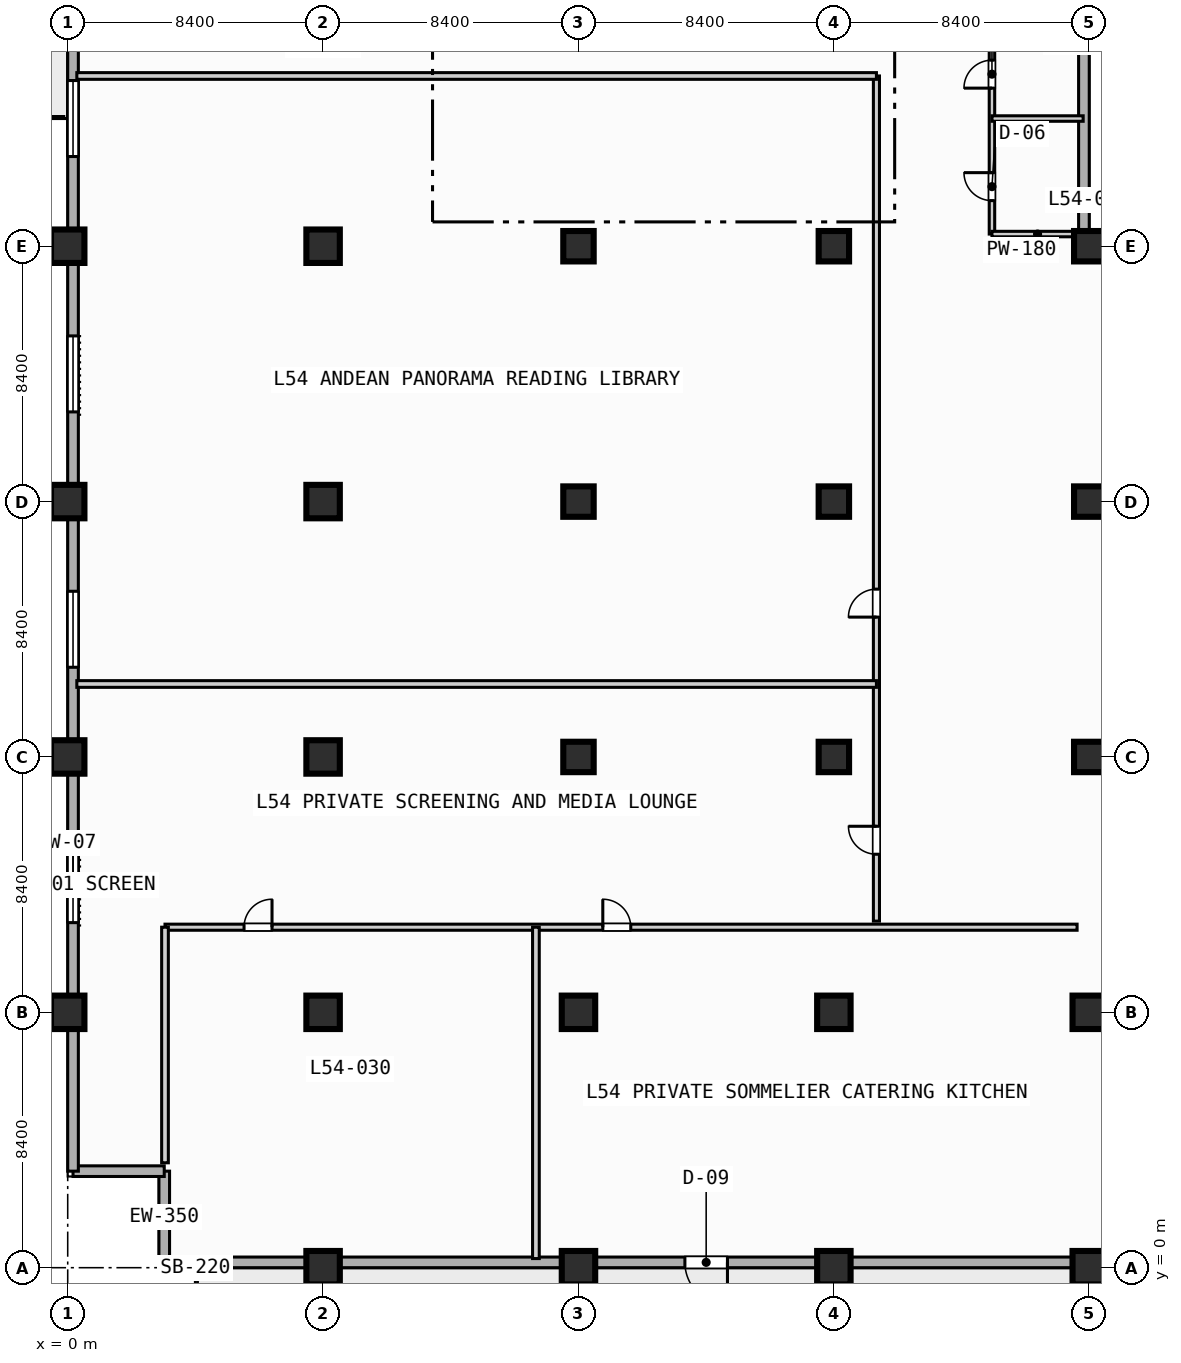
"""IFC4 building model, lengths in metres.
Left out: names, types, materials, properties, quantities, classifications, styles, units other than length and angle.
Written with IfcOpenShell. Run it as: python <this file> out.ifc"""

import sys

from ifc_helpers import new_model, si_unit, direction, frame, frame_2d, origin, origin_2d, place, context, subcontext, project, spatial, rectangle, extrude, element, fill, save


model = new_model("IFC4")
c1 = context("Model", 3, precision=1e-05, world=origin(), true_north=direction((0.0, 1.0)))
c2 = subcontext(c1, "Body", "Model", "MODEL_VIEW")
j1 = project(units=[si_unit("LENGTHUNIT", "METRE"), si_unit("PLANEANGLEUNIT", "RADIAN")], contexts=[c1])
p1 = place(None, origin())
s1 = spatial("IfcSite", under=j1, at=p1, CompositionType="ELEMENT")
p2 = place(p1, origin())
s2 = spatial("IfcBuilding", under=s1, at=p2, CompositionType="ELEMENT")
p3 = place(p2, frame((0.0, 0.0, 219.8)))
s3 = spatial("IfcBuildingStorey", under=s2, at=p3, CompositionType="ELEMENT", Elevation=219.8)
for number, where, z_axis, x_axis in (
    (1, (0.0, 8.4, 0.0), (0.0, 0.0, 1.0), (1.0, 0.0, 0.0)),
    (2, (0.0, 16.8, 0.0), (0.0, 0.0, 1.0), (1.0, 0.0, 0.0)),
    (3, (0.0, 25.2, 0.0), (0.0, 0.0, 1.0), (1.0, 0.0, 0.0)),
    (4, (0.0, 33.6, 0.0), (0.0, 0.0, 1.0), (1.0, 0.0, 0.0)),
    (5, (8.4, 0.0, 0.0), (0.0, 0.0, 1.0), (1.0, 0.0, 0.0)),
    (6, (8.4, 8.4, 0.0), (0.0, 0.0, 1.0), (1.0, 0.0, 0.0)),
    (7, (8.4, 16.8, 0.0), (0.0, 0.0, 1.0), (1.0, 0.0, 0.0)),
    (8, (8.4, 25.2, 0.0), (0.0, 0.0, 1.0), (1.0, 0.0, 0.0)),
    (9, (8.4, 33.6, 0.0), (0.0, 0.0, 1.0), (1.0, 0.0, 0.0)),
    (10, (16.8, 0.0, 0.0), (0.0, 0.0, 1.0), (1.0, 0.0, 0.0)),
    (11, (16.8, 8.4, 0.0), (0.0, 0.0, 1.0), (1.0, 0.0, 0.0)),
):
    element("IfcColumn", number, at=place(p3, frame(where, z_axis=z_axis, x_axis=x_axis)), inside=s3, PredefinedType="COLUMN", context=c2, shape_type="SweptSolid", body=[
        extrude(rectangle(XDim=1.1, YDim=1.1, at=origin_2d()), origin(), (0.0, 0.0, 1.0), 4.2),
    ])
for number, where, z_axis, x_axis in (
    (12, (16.8, 16.8, 0.0), (0.0, 0.0, 1.0), (1.0, 0.0, 0.0)),
    (13, (16.8, 25.2, 0.0), (0.0, 0.0, 1.0), (1.0, 0.0, 0.0)),
    (14, (16.8, 33.6, 0.0), (0.0, 0.0, 1.0), (1.0, 0.0, 0.0)),
):
    element("IfcColumn", number, at=place(p3, frame(where, z_axis=z_axis, x_axis=x_axis)), inside=s3, PredefinedType="COLUMN", context=c2, shape_type="SweptSolid", body=[
        extrude(rectangle(XDim=1.0, YDim=1.0, at=origin_2d()), origin(), (0.0, 0.0, 1.0), 4.2),
    ])
for number, where, z_axis, x_axis in (
    (15, (25.2, 0.0, 0.0), (0.0, 0.0, 1.0), (1.0, 0.0, 0.0)),
    (16, (25.2, 8.4, 0.0), (0.0, 0.0, 1.0), (1.0, 0.0, 0.0)),
):
    element("IfcColumn", number, at=place(p3, frame(where, z_axis=z_axis, x_axis=x_axis)), inside=s3, PredefinedType="COLUMN", context=c2, shape_type="SweptSolid", body=[
        extrude(rectangle(XDim=1.1, YDim=1.1, at=origin_2d()), origin(), (0.0, 0.0, 1.0), 4.2),
    ])
for number, where, z_axis, x_axis in (
    (17, (25.2, 16.8, 0.0), (0.0, 0.0, 1.0), (1.0, 0.0, 0.0)),
    (18, (25.2, 25.2, 0.0), (0.0, 0.0, 1.0), (1.0, 0.0, 0.0)),
    (19, (25.2, 33.6, 0.0), (0.0, 0.0, 1.0), (1.0, 0.0, 0.0)),
):
    element("IfcColumn", number, at=place(p3, frame(where, z_axis=z_axis, x_axis=x_axis)), inside=s3, PredefinedType="COLUMN", context=c2, shape_type="SweptSolid", body=[
        extrude(rectangle(XDim=1.0, YDim=1.0, at=origin_2d()), origin(), (0.0, 0.0, 1.0), 4.2),
    ])
for number, where, z_axis, x_axis in (
    (20, (33.6, 0.0, 0.0), (0.0, 0.0, 1.0), (1.0, 0.0, 0.0)),
    (21, (33.6, 8.4, 0.0), (0.0, 0.0, 1.0), (1.0, 0.0, 0.0)),
):
    element("IfcColumn", number, at=place(p3, frame(where, z_axis=z_axis, x_axis=x_axis)), inside=s3, PredefinedType="COLUMN", context=c2, shape_type="SweptSolid", body=[
        extrude(rectangle(XDim=1.1, YDim=1.1, at=origin_2d()), origin(), (0.0, 0.0, 1.0), 4.2),
    ])
for number, where, z_axis, x_axis in (
    (22, (33.6, 16.8, 0.0), (0.0, 0.0, 1.0), (1.0, 0.0, 0.0)),
    (23, (33.6, 25.2, 0.0), (0.0, 0.0, 1.0), (1.0, 0.0, 0.0)),
    (24, (33.6, 33.6, 0.0), (0.0, 0.0, 1.0), (1.0, 0.0, 0.0)),
):
    element("IfcColumn", number, at=place(p3, frame(where, z_axis=z_axis, x_axis=x_axis)), inside=s3, PredefinedType="COLUMN", context=c2, shape_type="SweptSolid", body=[
        extrude(rectangle(XDim=1.0, YDim=1.0, at=origin_2d()), origin(), (0.0, 0.0, 1.0), 4.2),
    ])
for number, where, z_axis, x_axis in (
    (25, (3.175, 0.175, 0.0), (0.0, 0.0, 1.0), (0.0, 1.0, 0.0)),
    (26, (3.175, 3.175, 0.0), (0.0, 0.0, 1.0), (-1.0, 0.0, 0.0)),
):
    element("IfcWall", number, at=place(p3, frame(where, z_axis=z_axis, x_axis=x_axis)), inside=s3, PredefinedType="STANDARD", context=c2, shape_type="SweptSolid", body=[
        extrude(rectangle(XDim=3.0, YDim=0.35, at=frame_2d((1.5, 0.0))), origin(), (0.0, 0.0, 1.0), 3.97),
    ])
p4 = place(p3, frame((0.175, 3.175, 0.0), z_axis=(0.0, 0.0, 1.0), x_axis=(0.0, 1.0, 0.0)))
e27 = element("IfcWall", 27, at=p4, inside=s3, PredefinedType="STANDARD", context=c2, shape_type="SweptSolid", body=[
    extrude(rectangle(XDim=69.25, YDim=0.35, at=frame_2d((34.625, 0.0))), origin(), (0.0, 0.0, 1.0), 3.97),
])
p5 = place(p4, frame((42.325, 0.0, 0.0)))
e28 = element("IfcOpeningElement", 28, at=p5, cuts=e27, PredefinedType="OPENING", context=c2, shape_type="SweptSolid", body=[
    extrude(rectangle(XDim=1.4, YDim=2.2, at=frame_2d((0.7, 1.1))), frame((0.0, 0.185, 0.0), z_axis=(0.0, -1.0, 0.0), x_axis=(1.0, 0.0, 0.0)), (0.0, 0.0, 1.0), 0.37),
])
p6 = place(p4, frame((8.175, 0.0, 0.85)))
e29 = element("IfcOpeningElement", 29, at=p6, cuts=e27, PredefinedType="OPENING", context=c2, shape_type="SweptSolid", body=[
    extrude(rectangle(XDim=2.5, YDim=2.2, at=frame_2d((1.25, 1.1))), frame((0.0, 0.185, 0.0), z_axis=(0.0, -1.0, 0.0), x_axis=(1.0, 0.0, 0.0)), (0.0, 0.0, 1.0), 0.37),
])
p7 = place(p4, frame((16.575, 0.0, 0.85)))
e30 = element("IfcOpeningElement", 30, at=p7, cuts=e27, PredefinedType="OPENING", context=c2, shape_type="SweptSolid", body=[
    extrude(rectangle(XDim=2.5, YDim=2.2, at=frame_2d((1.25, 1.1))), frame((0.0, 0.185, 0.0), z_axis=(0.0, -1.0, 0.0), x_axis=(1.0, 0.0, 0.0)), (0.0, 0.0, 1.0), 0.37),
])
p8 = place(p4, frame((24.975, 0.0, 0.85)))
e31 = element("IfcOpeningElement", 31, at=p8, cuts=e27, PredefinedType="OPENING", context=c2, shape_type="SweptSolid", body=[
    extrude(rectangle(XDim=2.5, YDim=2.2, at=frame_2d((1.25, 1.1))), frame((0.0, 0.185, 0.0), z_axis=(0.0, -1.0, 0.0), x_axis=(1.0, 0.0, 0.0)), (0.0, 0.0, 1.0), 0.37),
])
p9 = place(p4, frame((33.375, 0.0, 0.85)))
e32 = element("IfcOpeningElement", 32, at=p9, cuts=e27, PredefinedType="OPENING", context=c2, shape_type="SweptSolid", body=[
    extrude(rectangle(XDim=2.5, YDim=2.2, at=frame_2d((1.25, 1.1))), frame((0.0, 0.185, 0.0), z_axis=(0.0, -1.0, 0.0), x_axis=(1.0, 0.0, 0.0)), (0.0, 0.0, 1.0), 0.37),
])
p10 = place(p3, frame((33.425, 72.425, 0.0), z_axis=(0.0, 0.0, 1.0), x_axis=(0.0, -1.0, 0.0)))
e33 = element("IfcWall", 33, at=p10, inside=s3, PredefinedType="STANDARD", context=c2, shape_type="SweptSolid", body=[
    extrude(rectangle(XDim=39.0, YDim=0.35, at=frame_2d((19.5, 0.0))), origin(), (0.0, 0.0, 1.0), 3.97),
])
p11 = place(p3, frame((33.425, 33.425, 0.0), z_axis=(0.0, 0.0, 1.0), x_axis=(1.0, 0.0, 0.0)))
e34 = element("IfcWall", 34, at=p11, inside=s3, PredefinedType="STANDARD", context=c2, shape_type="SweptSolid", body=[
    extrude(rectangle(XDim=39.0, YDim=0.35, at=frame_2d((19.5, 0.0))), origin(), (0.0, 0.0, 1.0), 3.97),
])
p12 = place(p11, frame((12.075, 0.0, 0.0)))
e35 = element("IfcOpeningElement", 35, at=p12, cuts=e34, PredefinedType="OPENING", context=c2, shape_type="SweptSolid", body=[
    extrude(rectangle(XDim=1.4, YDim=2.2, at=frame_2d((0.7, 1.1))), frame((0.0, 0.185, 0.0), z_axis=(0.0, -1.0, 0.0), x_axis=(1.0, 0.0, 0.0)), (0.0, 0.0, 1.0), 0.37),
])
p13 = place(p3, frame((72.425, 0.175, 0.0), z_axis=(0.0, 0.0, 1.0), x_axis=(-1.0, 0.0, 0.0)))
e36 = element("IfcWall", 36, at=p13, inside=s3, PredefinedType="STANDARD", context=c2, shape_type="SweptSolid", body=[
    extrude(rectangle(XDim=69.25, YDim=0.35, at=frame_2d((34.625, 0.0))), origin(), (0.0, 0.0, 1.0), 3.97),
])
p14 = place(p13, frame((50.725, 0.0, 0.0)))
e37 = element("IfcOpeningElement", 37, at=p14, cuts=e36, PredefinedType="OPENING", context=c2, shape_type="SweptSolid", body=[
    extrude(rectangle(XDim=1.4, YDim=2.2, at=frame_2d((0.7, 1.1))), frame((0.0, 0.185, 0.0), z_axis=(0.0, -1.0, 0.0), x_axis=(1.0, 0.0, 0.0)), (0.0, 0.0, 1.0), 0.37),
])
p15 = place(p13, frame((24.975, 0.0, 0.85)))
e38 = element("IfcOpeningElement", 38, at=p15, cuts=e36, PredefinedType="OPENING", context=c2, shape_type="SweptSolid", body=[
    extrude(rectangle(XDim=2.5, YDim=2.2, at=frame_2d((1.25, 1.1))), frame((0.0, 0.185, 0.0), z_axis=(0.0, -1.0, 0.0), x_axis=(1.0, 0.0, 0.0)), (0.0, 0.0, 1.0), 0.37),
])
p16 = place(p13, frame((8.175, 0.0, 0.85)))
e39 = element("IfcOpeningElement", 39, at=p16, cuts=e36, PredefinedType="OPENING", context=c2, shape_type="SweptSolid", body=[
    extrude(rectangle(XDim=2.5, YDim=2.2, at=frame_2d((1.25, 1.1))), frame((0.0, 0.185, 0.0), z_axis=(0.0, -1.0, 0.0), x_axis=(1.0, 0.0, 0.0)), (0.0, 0.0, 1.0), 0.37),
])
p17 = place(p3, frame((30.4, 34.0, 0.0), z_axis=(0.0, 0.0, 1.0), x_axis=(0.0, 1.0, 0.0)))
e40 = element("IfcWall", 40, at=p17, inside=s3, PredefinedType="PLUMBINGWALL", context=c2, shape_type="SweptSolid", body=[
    extrude(rectangle(XDim=7.6, YDim=0.18, at=frame_2d((3.8, 0.0))), origin(), (0.0, 0.0, 1.0), 3.97),
])
p18 = place(p17, frame((1.1, 0.0, 0.0)))
e41 = element("IfcOpeningElement", 41, at=p18, cuts=e40, PredefinedType="OPENING", context=c2, shape_type="SweptSolid", body=[
    extrude(rectangle(XDim=0.92, YDim=2.1, at=frame_2d((0.46, 1.05))), frame((0.0, 0.1, 0.0), z_axis=(0.0, -1.0, 0.0), x_axis=(1.0, 0.0, 0.0)), (0.0, 0.0, 1.0), 0.2),
])
p19 = place(p17, frame((4.8, 0.0, 0.0)))
e42 = element("IfcOpeningElement", 42, at=p19, cuts=e40, PredefinedType="OPENING", context=c2, shape_type="SweptSolid", body=[
    extrude(rectangle(XDim=0.92, YDim=2.1, at=frame_2d((0.46, 1.05))), frame((0.0, 0.1, 0.0), z_axis=(0.0, -1.0, 0.0), x_axis=(1.0, 0.0, 0.0)), (0.0, 0.0, 1.0), 0.2),
])
for number, where, z_axis, x_axis in (
    (43, (30.4, 34.0, 0.0), (0.0, 0.0, 1.0), (1.0, 0.0, 0.0)),
    (44, (30.4, 37.8, 0.0), (0.0, 0.0, 1.0), (1.0, 0.0, 0.0)),
):
    element("IfcWall", number, at=place(p3, frame(where, z_axis=z_axis, x_axis=x_axis)), inside=s3, PredefinedType="PLUMBINGWALL", context=c2, shape_type="SweptSolid", body=[
        extrude(rectangle(XDim=3.0, YDim=0.18, at=frame_2d((1.5, 0.0))), origin(), (0.0, 0.0, 1.0), 3.97),
    ])
p20 = place(p3, frame((3.2, 11.2, 0.0), z_axis=(0.0, 0.0, 1.0), x_axis=(1.0, 0.0, 0.0)))
e45 = element("IfcWall", 45, at=p20, inside=s3, PredefinedType="PARTITIONING", context=c2, shape_type="SweptSolid", body=[
    extrude(rectangle(XDim=30.0, YDim=0.2, at=frame_2d((15.0, 0.0))), origin(), (0.0, 0.0, 1.0), 3.97),
])
p21 = place(p20, frame((2.6, 0.0, 0.0)))
e46 = element("IfcOpeningElement", 46, at=p21, cuts=e45, PredefinedType="OPENING", context=c2, shape_type="SweptSolid", body=[
    extrude(rectangle(XDim=0.92, YDim=2.1, at=frame_2d((0.46, 1.05))), frame((0.0, 0.11, 0.0), z_axis=(0.0, -1.0, 0.0), x_axis=(1.0, 0.0, 0.0)), (0.0, 0.0, 1.0), 0.22),
])
p22 = place(p20, frame((14.4, 0.0, 0.0)))
e47 = element("IfcOpeningElement", 47, at=p22, cuts=e45, PredefinedType="OPENING", context=c2, shape_type="SweptSolid", body=[
    extrude(rectangle(XDim=0.92, YDim=2.1, at=frame_2d((0.46, 1.05))), frame((0.0, 0.11, 0.0), z_axis=(0.0, -1.0, 0.0), x_axis=(1.0, 0.0, 0.0)), (0.0, 0.0, 1.0), 0.22),
])
p23 = place(p3, frame((3.2, 3.45, 0.0), z_axis=(0.0, 0.0, 1.0), x_axis=(0.0, 1.0, 0.0)))
e48 = element("IfcWall", 48, at=p23, inside=s3, PredefinedType="PARTITIONING", context=c2, shape_type="SweptSolid", body=[
    extrude(rectangle(XDim=7.75, YDim=0.22, at=frame_2d((3.875, 0.0))), origin(), (0.0, 0.0, 1.0), 3.97),
])
p24 = place(p3, frame((15.4, 0.3, 0.0), z_axis=(0.0, 0.0, 1.0), x_axis=(0.0, 1.0, 0.0)))
e49 = element("IfcWall", 49, at=p24, inside=s3, PredefinedType="PARTITIONING", context=c2, shape_type="SweptSolid", body=[
    extrude(rectangle(XDim=10.9, YDim=0.22, at=frame_2d((5.45, 0.0))), origin(), (0.0, 0.0, 1.0), 3.97),
])
p25 = place(p3, frame((26.6, 11.4, 0.0), z_axis=(0.0, 0.0, 1.0), x_axis=(0.0, 1.0, 0.0)))
e50 = element("IfcWall", 50, at=p25, inside=s3, PredefinedType="PARTITIONING", context=c2, shape_type="SweptSolid", body=[
    extrude(rectangle(XDim=27.8, YDim=0.2, at=frame_2d((13.9, 0.0))), origin(), (0.0, 0.0, 1.0), 3.97),
])
p26 = place(p25, frame((2.2, 0.0, 0.0)))
e51 = element("IfcOpeningElement", 51, at=p26, cuts=e50, PredefinedType="OPENING", context=c2, shape_type="SweptSolid", body=[
    extrude(rectangle(XDim=0.92, YDim=2.1, at=frame_2d((0.46, 1.05))), frame((0.0, 0.11, 0.0), z_axis=(0.0, -1.0, 0.0), x_axis=(1.0, 0.0, 0.0)), (0.0, 0.0, 1.0), 0.22),
])
p27 = place(p25, frame((10.0, 0.0, 0.0)))
e52 = element("IfcOpeningElement", 52, at=p27, cuts=e50, PredefinedType="OPENING", context=c2, shape_type="SweptSolid", body=[
    extrude(rectangle(XDim=0.92, YDim=2.1, at=frame_2d((0.46, 1.05))), frame((0.0, 0.11, 0.0), z_axis=(0.0, -1.0, 0.0), x_axis=(1.0, 0.0, 0.0)), (0.0, 0.0, 1.0), 0.22),
])
for number, where, z_axis, x_axis in (
    (53, (0.3, 19.2, 0.0), (0.0, 0.0, 1.0), (1.0, 0.0, 0.0)),
    (54, (0.3, 39.2, 0.0), (0.0, 0.0, 1.0), (1.0, 0.0, 0.0)),
):
    element("IfcWall", number, at=place(p3, frame(where, z_axis=z_axis, x_axis=x_axis)), inside=s3, PredefinedType="PARTITIONING", context=c2, shape_type="SweptSolid", body=[
        extrude(rectangle(XDim=26.3, YDim=0.22, at=frame_2d((13.15, 0.0))), origin(), (0.0, 0.0, 1.0), 3.97),
    ])
p28 = place(p6, origin())
e55 = element("IfcWindow", 55, at=p28, inside=s3, PartitioningType="SINGLE_PANEL", PredefinedType="WINDOW", context=c2, shape_type="SweptSolid", body=[
    extrude(rectangle(XDim=2.5, YDim=2.2, at=frame_2d((1.25, 1.1))), frame((0.0, 0.03, 0.0), z_axis=(0.0, -1.0, 0.0), x_axis=(1.0, 0.0, 0.0)), (0.0, 0.0, 1.0), 0.06),
])
fill(e29, e55)
p29 = place(p7, origin())
e56 = element("IfcWindow", 56, at=p29, inside=s3, PartitioningType="SINGLE_PANEL", PredefinedType="WINDOW", context=c2, shape_type="SweptSolid", body=[
    extrude(rectangle(XDim=2.5, YDim=2.2, at=frame_2d((1.25, 1.1))), frame((0.0, 0.03, 0.0), z_axis=(0.0, -1.0, 0.0), x_axis=(1.0, 0.0, 0.0)), (0.0, 0.0, 1.0), 0.06),
])
fill(e30, e56)
p30 = place(p8, origin())
e57 = element("IfcWindow", 57, at=p30, inside=s3, PartitioningType="SINGLE_PANEL", PredefinedType="WINDOW", context=c2, shape_type="SweptSolid", body=[
    extrude(rectangle(XDim=2.5, YDim=2.2, at=frame_2d((1.25, 1.1))), frame((0.0, 0.03, 0.0), z_axis=(0.0, -1.0, 0.0), x_axis=(1.0, 0.0, 0.0)), (0.0, 0.0, 1.0), 0.06),
])
fill(e31, e57)
p31 = place(p9, origin())
e58 = element("IfcWindow", 58, at=p31, inside=s3, PartitioningType="SINGLE_PANEL", PredefinedType="WINDOW", context=c2, shape_type="SweptSolid", body=[
    extrude(rectangle(XDim=2.5, YDim=2.2, at=frame_2d((1.25, 1.1))), frame((0.0, 0.03, 0.0), z_axis=(0.0, -1.0, 0.0), x_axis=(1.0, 0.0, 0.0)), (0.0, 0.0, 1.0), 0.06),
])
fill(e32, e58)
p32 = place(p14, origin())
e59 = element("IfcDoor", 59, at=p32, inside=s3, OperationType="SINGLE_SWING_LEFT", PredefinedType="DOOR", context=c2, shape_type="SweptSolid", body=[
    extrude(rectangle(XDim=1.4, YDim=2.2, at=frame_2d((0.7, 1.1))), frame((0.0, 0.025, 0.0), z_axis=(0.0, -1.0, 0.0), x_axis=(1.0, 0.0, 0.0)), (0.0, 0.0, 1.0), 0.05),
])
fill(e37, e59)
p33 = place(p18, origin())
e60 = element("IfcDoor", 60, at=p33, inside=s3, OperationType="SINGLE_SWING_RIGHT", PredefinedType="DOOR", context=c2, shape_type="SweptSolid", body=[
    extrude(rectangle(XDim=0.92, YDim=2.1, at=frame_2d((0.46, 1.05))), frame((0.0, 0.025, 0.0), z_axis=(0.0, -1.0, 0.0), x_axis=(1.0, 0.0, 0.0)), (0.0, 0.0, 1.0), 0.05),
])
fill(e41, e60)
p34 = place(p19, origin())
e61 = element("IfcDoor", 61, at=p34, inside=s3, OperationType="SINGLE_SWING_LEFT", PredefinedType="DOOR", context=c2, shape_type="SweptSolid", body=[
    extrude(rectangle(XDim=0.92, YDim=2.1, at=frame_2d((0.46, 1.05))), frame((0.0, 0.025, 0.0), z_axis=(0.0, -1.0, 0.0), x_axis=(1.0, 0.0, 0.0)), (0.0, 0.0, 1.0), 0.05),
])
fill(e42, e61)
p35 = place(p21, origin())
e62 = element("IfcDoor", 62, at=p35, inside=s3, OperationType="SINGLE_SWING_RIGHT", PredefinedType="DOOR", context=c2, shape_type="SweptSolid", body=[
    extrude(rectangle(XDim=0.92, YDim=2.1, at=frame_2d((0.46, 1.05))), frame((0.0, 0.025, 0.0), z_axis=(0.0, -1.0, 0.0), x_axis=(1.0, 0.0, 0.0)), (0.0, 0.0, 1.0), 0.05),
])
fill(e46, e62)
p36 = place(p22, origin())
e63 = element("IfcDoor", 63, at=p36, inside=s3, OperationType="SINGLE_SWING_LEFT", PredefinedType="DOOR", context=c2, shape_type="SweptSolid", body=[
    extrude(rectangle(XDim=0.92, YDim=2.1, at=frame_2d((0.46, 1.05))), frame((0.0, 0.025, 0.0), z_axis=(0.0, -1.0, 0.0), x_axis=(1.0, 0.0, 0.0)), (0.0, 0.0, 1.0), 0.05),
])
fill(e47, e63)
p37 = place(p26, origin())
e64 = element("IfcDoor", 64, at=p37, inside=s3, OperationType="SINGLE_SWING_RIGHT", PredefinedType="DOOR", context=c2, shape_type="SweptSolid", body=[
    extrude(rectangle(XDim=0.92, YDim=2.1, at=frame_2d((0.46, 1.05))), frame((0.0, 0.025, 0.0), z_axis=(0.0, -1.0, 0.0), x_axis=(1.0, 0.0, 0.0)), (0.0, 0.0, 1.0), 0.05),
])
fill(e51, e64)
p38 = place(p27, origin())
e65 = element("IfcDoor", 65, at=p38, inside=s3, OperationType="SINGLE_SWING_LEFT", PredefinedType="DOOR", context=c2, shape_type="SweptSolid", body=[
    extrude(rectangle(XDim=0.92, YDim=2.1, at=frame_2d((0.46, 1.05))), frame((0.0, 0.025, 0.0), z_axis=(0.0, -1.0, 0.0), x_axis=(1.0, 0.0, 0.0)), (0.0, 0.0, 1.0), 0.05),
])
fill(e52, e65)
save(model, sys.argv[1])
